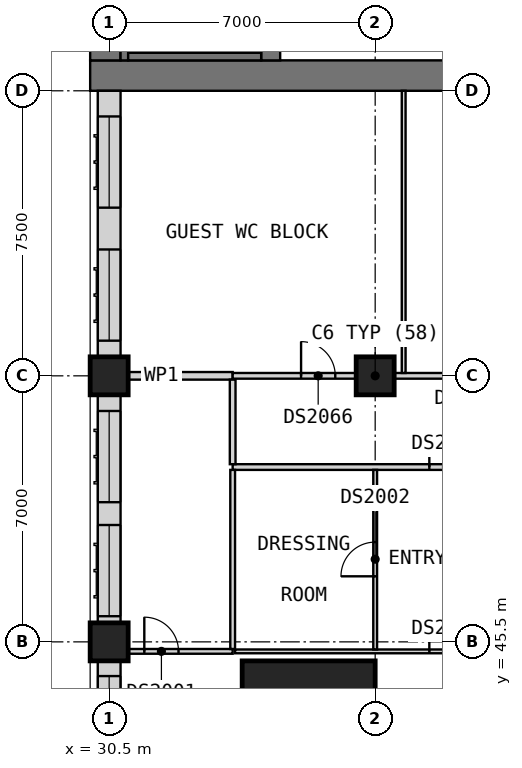
"""IFC4 building model, lengths in metres.
Left out: names, types, materials, properties, quantities, classifications, styles, units other than length and angle.
Written with IfcOpenShell. Run it as: python <this file> out.ifc"""

import sys

from ifc_helpers import new_model, si_unit, direction, frame, frame_2d, origin, origin_2d, place, context, subcontext, project, spatial, rectangle, extrude, element, fill, save


model = new_model("IFC4")
c1 = context("Model", 3, precision=1e-05, world=origin(), true_north=direction((0.0, 1.0)))
c2 = subcontext(c1, "Body", "Model", "MODEL_VIEW")
j1 = project(units=[si_unit("LENGTHUNIT", "METRE"), si_unit("PLANEANGLEUNIT", "RADIAN")], contexts=[c1])
p1 = place(None, origin())
s1 = spatial("IfcSite", under=j1, at=p1, CompositionType="ELEMENT")
p2 = place(p1, origin())
s2 = spatial("IfcBuilding", under=s1, at=p2, CompositionType="ELEMENT")
p3 = place(p2, frame((0.0, 0.0, 133.8)))
s3 = spatial("IfcBuildingStorey", under=s2, at=p3, CompositionType="ELEMENT", Elevation=133.8)
for number, where, z_axis, x_axis in (
    (1, (30.5, 45.5, 0.0), (0.0, 0.0, 1.0), (1.0, 0.0, 0.0)),
    (2, (30.5, 52.5, 0.0), (0.0, 0.0, 1.0), (1.0, 0.0, 0.0)),
    (3, (37.5, 52.5, 0.0), (0.0, 0.0, 1.0), (1.0, 0.0, 0.0)),
):
    element("IfcColumn", number, at=place(p3, frame(where, z_axis=z_axis, x_axis=x_axis)), inside=s3, PredefinedType="COLUMN", context=c2, shape_type="SweptSolid", body=[
        extrude(rectangle(XDim=1.0, YDim=1.0, at=origin_2d()), origin(), (0.0, 0.0, 1.0), 3.6),
    ])
p4 = place(p3, frame((35.75, 43.25, 0.0), z_axis=(0.0, 0.0, 1.0), x_axis=(1.0, 0.0, 0.0)))
e4 = element("IfcColumn", 4, at=p4, inside=s3, PredefinedType="COLUMN", context=c2, shape_type="SweptSolid", body=[
    extrude(rectangle(XDim=3.5, YDim=3.5, at=origin_2d()), origin(), (0.0, 0.0, 1.0), 3.6),
])
p5 = place(p3, frame((30.0, 60.4, 0.0), z_axis=(0.0, 0.0, 1.0), x_axis=(1.0, 0.0, 0.0)))
e5 = element("IfcWall", 5, at=p5, inside=s3, PredefinedType="SHEAR", context=c2, shape_type="SweptSolid", body=[
    extrude(rectangle(XDim=30.0, YDim=0.8, at=frame_2d((15.0, 0.0))), origin(), (0.0, 0.0, 1.0), 3.6),
])
p6 = place(p5, frame((21.9, 0.0, 0.0)))
e6 = element("IfcOpeningElement", 6, at=p6, cuts=e5, PredefinedType="OPENING", context=c2, shape_type="SweptSolid", body=[
    extrude(rectangle(XDim=1.8, YDim=2.1, at=frame_2d((0.9, 1.05))), frame((0.0, 0.41, 0.0), z_axis=(0.0, -1.0, 0.0), x_axis=(1.0, 0.0, 0.0)), (0.0, 0.0, 1.0), 0.82),
])
p7 = place(p5, frame((26.5, 0.0, 0.0)))
e7 = element("IfcOpeningElement", 7, at=p7, cuts=e5, PredefinedType="OPENING", context=c2, shape_type="SweptSolid", body=[
    extrude(rectangle(XDim=1.2, YDim=2.1, at=frame_2d((0.6, 1.05))), frame((0.0, 0.41, 0.0), z_axis=(0.0, -1.0, 0.0), x_axis=(1.0, 0.0, 0.0)), (0.0, 0.0, 1.0), 0.82),
])
p8 = place(p3, frame((30.4, 60.8, 0.0), z_axis=(0.0, 0.0, 1.0), x_axis=(0.0, 1.0, 0.0)))
e8 = element("IfcWall", 8, at=p8, inside=s3, PredefinedType="SHEAR", context=c2, shape_type="SweptSolid", body=[
    extrude(rectangle(XDim=20.9, YDim=0.8, at=frame_2d((10.45, 0.0))), origin(), (0.0, 0.0, 1.0), 3.6),
])
p9 = place(p3, frame((34.75, 60.8, 0.0), z_axis=(0.0, 0.0, 1.0), x_axis=(0.0, 1.0, 0.0)))
e9 = element("IfcWall", 9, at=p9, inside=s3, PredefinedType="SHEAR", context=c2, shape_type="SweptSolid", body=[
    extrude(rectangle(XDim=3.4, YDim=0.5, at=frame_2d((1.7, 0.0))), origin(), (0.0, 0.0, 1.0), 3.6),
])
p10 = place(p3, frame((30.5, 60.0, 0.0), z_axis=(0.0, 0.0, 1.0), x_axis=(0.0, -1.0, 0.0)))
e10 = element("IfcWall", 10, at=p10, inside=s3, PredefinedType="SOLIDWALL", context=c2, shape_type="SweptSolid", body=[
    extrude(rectangle(XDim=7.0, YDim=0.6, at=frame_2d((3.5, 0.0))), origin(), (0.0, 0.0, 1.0), 3.35),
])
p11 = place(p10, frame((4.175, 0.0, 0.8)))
e11 = element("IfcOpeningElement", 11, at=p11, cuts=e10, PredefinedType="OPENING", context=c2, shape_type="SweptSolid", body=[
    extrude(rectangle(XDim=2.4, YDim=1.8, at=frame_2d((1.2, 0.9))), frame((0.0, 0.31, 0.0), z_axis=(0.0, -1.0, 0.0), x_axis=(1.0, 0.0, 0.0)), (0.0, 0.0, 1.0), 0.62),
])
p12 = place(p10, frame((0.675, 0.0, 0.8)))
e12 = element("IfcOpeningElement", 12, at=p12, cuts=e10, PredefinedType="OPENING", context=c2, shape_type="SweptSolid", body=[
    extrude(rectangle(XDim=2.4, YDim=1.8, at=frame_2d((1.2, 0.9))), frame((0.0, 0.31, 0.0), z_axis=(0.0, -1.0, 0.0), x_axis=(1.0, 0.0, 0.0)), (0.0, 0.0, 1.0), 0.62),
])
p13 = place(p3, frame((30.5, 52.0, 0.0), z_axis=(0.0, 0.0, 1.0), x_axis=(0.0, -1.0, 0.0)))
e13 = element("IfcWall", 13, at=p13, inside=s3, PredefinedType="SOLIDWALL", context=c2, shape_type="SweptSolid", body=[
    extrude(rectangle(XDim=6.0, YDim=0.6, at=frame_2d((3.0, 0.0))), origin(), (0.0, 0.0, 1.0), 2.85),
])
p14 = place(p13, frame((3.425, 0.0, 0.8)))
e14 = element("IfcOpeningElement", 14, at=p14, cuts=e13, PredefinedType="OPENING", context=c2, shape_type="SweptSolid", body=[
    extrude(rectangle(XDim=2.4, YDim=1.8, at=frame_2d((1.2, 0.9))), frame((0.0, 0.31, 0.0), z_axis=(0.0, -1.0, 0.0), x_axis=(1.0, 0.0, 0.0)), (0.0, 0.0, 1.0), 0.62),
])
p15 = place(p13, frame((0.425, 0.0, 0.8)))
e15 = element("IfcOpeningElement", 15, at=p15, cuts=e13, PredefinedType="OPENING", context=c2, shape_type="SweptSolid", body=[
    extrude(rectangle(XDim=2.4, YDim=1.8, at=frame_2d((1.2, 0.9))), frame((0.0, 0.31, 0.0), z_axis=(0.0, -1.0, 0.0), x_axis=(1.0, 0.0, 0.0)), (0.0, 0.0, 1.0), 0.62),
])
p16 = place(p3, frame((30.5, 45.0, 0.0), z_axis=(0.0, 0.0, 1.0), x_axis=(0.0, -1.0, 0.0)))
e16 = element("IfcWall", 16, at=p16, inside=s3, PredefinedType="SOLIDWALL", context=c2, shape_type="SweptSolid", body=[
    extrude(rectangle(XDim=3.5, YDim=0.6, at=frame_2d((1.75, 0.0))), origin(), (0.0, 0.0, 1.0), 3.35),
])
p17 = place(p16, frame((0.4, 0.0, 0.8)))
e17 = element("IfcOpeningElement", 17, at=p17, cuts=e16, PredefinedType="OPENING", context=c2, shape_type="SweptSolid", body=[
    extrude(rectangle(XDim=1.8, YDim=1.8, at=frame_2d((0.9, 0.9))), frame((0.0, 0.31, 0.0), z_axis=(0.0, -1.0, 0.0), x_axis=(1.0, 0.0, 0.0)), (0.0, 0.0, 1.0), 0.62),
])
p18 = place(p3, frame((30.9, 60.8, 0.0), z_axis=(0.0, 0.0, 1.0), x_axis=(0.0, 1.0, 0.0)))
e18 = element("IfcWall", 18, at=p18, inside=s3, PredefinedType="SOLIDWALL", context=c2, shape_type="SweptSolid", body=[
    extrude(rectangle(XDim=20.9, YDim=0.2, at=frame_2d((10.45, 0.0))), origin(), (0.0, 0.0, 1.0), 3.35),
])
p19 = place(p3, frame((31.0, 60.9, 0.0), z_axis=(0.0, 0.0, 1.0), x_axis=(1.0, 0.0, 0.0)))
e19 = element("IfcWall", 19, at=p19, inside=s3, PredefinedType="SOLIDWALL", context=c2, shape_type="SweptSolid", body=[
    extrude(rectangle(XDim=3.5, YDim=0.2, at=frame_2d((1.75, 0.0))), origin(), (0.0, 0.0, 1.0), 3.35),
])
p20 = place(p3, frame((30.0, 52.5, 0.0), z_axis=(0.0, 0.0, 1.0), x_axis=(1.0, 0.0, 0.0)))
e20 = element("IfcWall", 20, at=p20, inside=s3, PredefinedType="PARTITIONING", context=c2, shape_type="SweptSolid", body=[
    extrude(rectangle(XDim=3.75, YDim=0.2, at=frame_2d((1.875, 0.0))), origin(), (0.0, 0.0, 1.0), 3.35),
])
p21 = place(p3, frame((33.75, 50.1, 0.0), z_axis=(0.0, 0.0, 1.0), x_axis=(1.0, 0.0, 0.0)))
e21 = element("IfcWall", 21, at=p21, inside=s3, PredefinedType="PARTITIONING", context=c2, shape_type="SweptSolid", body=[
    extrude(rectangle(XDim=39.9, YDim=0.15, at=frame_2d((19.95, 0.0))), origin(), (0.0, 0.0, 1.0), 3.35),
])
p22 = place(p21, frame((5.175, 0.0, 0.0)))
e22 = element("IfcOpeningElement", 22, at=p22, cuts=e21, PredefinedType="OPENING", context=c2, shape_type="SweptSolid", body=[
    extrude(rectangle(XDim=0.9, YDim=2.1, at=frame_2d((0.45, 1.05))), frame((0.0, 0.085, 0.0), z_axis=(0.0, -1.0, 0.0), x_axis=(1.0, 0.0, 0.0)), (0.0, 0.0, 1.0), 0.17),
])
p23 = place(p21, frame((13.05, 0.0, 0.0)))
e23 = element("IfcOpeningElement", 23, at=p23, cuts=e21, PredefinedType="OPENING", context=c2, shape_type="SweptSolid", body=[
    extrude(rectangle(XDim=0.9, YDim=2.1, at=frame_2d((0.45, 1.05))), frame((0.0, 0.085, 0.0), z_axis=(0.0, -1.0, 0.0), x_axis=(1.0, 0.0, 0.0)), (0.0, 0.0, 1.0), 0.17),
])
p24 = place(p21, frame((20.55, 0.0, 0.0)))
e24 = element("IfcOpeningElement", 24, at=p24, cuts=e21, PredefinedType="OPENING", context=c2, shape_type="SweptSolid", body=[
    extrude(rectangle(XDim=0.9, YDim=2.1, at=frame_2d((0.45, 1.05))), frame((0.0, 0.085, 0.0), z_axis=(0.0, -1.0, 0.0), x_axis=(1.0, 0.0, 0.0)), (0.0, 0.0, 1.0), 0.17),
])
p25 = place(p21, frame((24.3, 0.0, 0.0)))
e25 = element("IfcOpeningElement", 25, at=p25, cuts=e21, PredefinedType="OPENING", context=c2, shape_type="SweptSolid", body=[
    extrude(rectangle(XDim=0.9, YDim=2.1, at=frame_2d((0.45, 1.05))), frame((0.0, 0.085, 0.0), z_axis=(0.0, -1.0, 0.0), x_axis=(1.0, 0.0, 0.0)), (0.0, 0.0, 1.0), 0.17),
])
p26 = place(p21, frame((36.113, 0.0, 0.0)))
e26 = element("IfcOpeningElement", 26, at=p26, cuts=e21, PredefinedType="OPENING", context=c2, shape_type="SweptSolid", body=[
    extrude(rectangle(XDim=0.9, YDim=2.1, at=frame_2d((0.45, 1.05))), frame((0.0, 0.085, 0.0), z_axis=(0.0, -1.0, 0.0), x_axis=(1.0, 0.0, 0.0)), (0.0, 0.0, 1.0), 0.17),
])
p27 = place(p21, frame((38.25, 0.0, 0.0)))
e27 = element("IfcOpeningElement", 27, at=p27, cuts=e21, PredefinedType="OPENING", context=c2, shape_type="SweptSolid", body=[
    extrude(rectangle(XDim=0.9, YDim=2.1, at=frame_2d((0.45, 1.05))), frame((0.0, 0.085, 0.0), z_axis=(0.0, -1.0, 0.0), x_axis=(1.0, 0.0, 0.0)), (0.0, 0.0, 1.0), 0.17),
])
p28 = place(p3, frame((33.75, 52.5, 0.0), z_axis=(0.0, 0.0, 1.0), x_axis=(1.0, 0.0, 0.0)))
e28 = element("IfcWall", 28, at=p28, inside=s3, PredefinedType="PARTITIONING", context=c2, shape_type="SweptSolid", body=[
    extrude(rectangle(XDim=17.15, YDim=0.15, at=frame_2d((8.575, 0.0))), origin(), (0.0, 0.0, 1.0), 3.35),
])
p29 = place(p28, frame((1.8, 0.0, 0.0)))
e29 = element("IfcOpeningElement", 29, at=p29, cuts=e28, PredefinedType="OPENING", context=c2, shape_type="SweptSolid", body=[
    extrude(rectangle(XDim=0.9, YDim=2.1, at=frame_2d((0.45, 1.05))), frame((0.0, 0.085, 0.0), z_axis=(0.0, -1.0, 0.0), x_axis=(1.0, 0.0, 0.0)), (0.0, 0.0, 1.0), 0.17),
])
p30 = place(p28, frame((5.775, 0.0, 0.0)))
e30 = element("IfcOpeningElement", 30, at=p30, cuts=e28, PredefinedType="OPENING", context=c2, shape_type="SweptSolid", body=[
    extrude(rectangle(XDim=0.9, YDim=2.1, at=frame_2d((0.45, 1.05))), frame((0.0, 0.085, 0.0), z_axis=(0.0, -1.0, 0.0), x_axis=(1.0, 0.0, 0.0)), (0.0, 0.0, 1.0), 0.17),
])
p31 = place(p28, frame((12.1, 0.0, 0.0)))
e31 = element("IfcOpeningElement", 31, at=p31, cuts=e28, PredefinedType="OPENING", context=c2, shape_type="SweptSolid", body=[
    extrude(rectangle(XDim=0.9, YDim=2.1, at=frame_2d((0.45, 1.05))), frame((0.0, 0.085, 0.0), z_axis=(0.0, -1.0, 0.0), x_axis=(1.0, 0.0, 0.0)), (0.0, 0.0, 1.0), 0.17),
])
p32 = place(p3, frame((33.75, 50.175, 0.0), z_axis=(0.0, 0.0, 1.0), x_axis=(0.0, 1.0, 0.0)))
e32 = element("IfcWall", 32, at=p32, inside=s3, PredefinedType="PARTITIONING", context=c2, shape_type="SweptSolid", body=[
    extrude(rectangle(XDim=2.225, YDim=0.15, at=frame_2d((1.112, 0.0))), origin(), (0.0, 0.0, 1.0), 3.35),
])
p33 = place(p3, frame((33.812, 45.25, 0.0), z_axis=(0.0, 0.0, 1.0), x_axis=(1.0, 0.0, 0.0)))
e33 = element("IfcWall", 33, at=p33, inside=s3, PredefinedType="PARTITIONING", context=c2, shape_type="SweptSolid", body=[
    extrude(rectangle(XDim=7.337, YDim=0.1, at=frame_2d((3.669, 0.0))), origin(), (0.0, 0.0, 1.0), 3.35),
])
p34 = place(p33, frame((5.113, 0.0, 0.0)))
e34 = element("IfcOpeningElement", 34, at=p34, cuts=e33, PredefinedType="OPENING", context=c2, shape_type="SweptSolid", body=[
    extrude(rectangle(XDim=0.9, YDim=2.1, at=frame_2d((0.45, 1.05))), frame((0.0, 0.06, 0.0), z_axis=(0.0, -1.0, 0.0), x_axis=(1.0, 0.0, 0.0)), (0.0, 0.0, 1.0), 0.12),
])
p35 = place(p3, frame((37.5, 45.3, 0.0), z_axis=(0.0, 0.0, 1.0), x_axis=(0.0, 1.0, 0.0)))
e35 = element("IfcWall", 35, at=p35, inside=s3, PredefinedType="PARTITIONING", context=c2, shape_type="SweptSolid", body=[
    extrude(rectangle(XDim=4.725, YDim=0.1, at=frame_2d((2.362, 0.0))), origin(), (0.0, 0.0, 1.0), 3.35),
])
p36 = place(p35, frame((1.925, 0.0, 0.0)))
e36 = element("IfcOpeningElement", 36, at=p36, cuts=e35, PredefinedType="OPENING", context=c2, shape_type="SweptSolid", body=[
    extrude(rectangle(XDim=0.9, YDim=2.1, at=frame_2d((0.45, 1.05))), frame((0.0, 0.06, 0.0), z_axis=(0.0, -1.0, 0.0), x_axis=(1.0, 0.0, 0.0)), (0.0, 0.0, 1.0), 0.12),
])
p37 = place(p3, frame((38.25, 52.575, 0.0), z_axis=(0.0, 0.0, 1.0), x_axis=(0.0, 1.0, 0.0)))
e37 = element("IfcWall", 37, at=p37, inside=s3, PredefinedType="PARTITIONING", context=c2, shape_type="SweptSolid", body=[
    extrude(rectangle(XDim=7.425, YDim=0.1, at=frame_2d((3.712, 0.0))), origin(), (0.0, 0.0, 1.0), 3.35),
])
p38 = place(p3, frame((30.0, 45.25, 0.0), z_axis=(0.0, 0.0, 1.0), x_axis=(1.0, 0.0, 0.0)))
e38 = element("IfcWall", 38, at=p38, inside=s3, PredefinedType="PARTITIONING", context=c2, shape_type="SweptSolid", body=[
    extrude(rectangle(XDim=3.75, YDim=0.125, at=frame_2d((1.875, 0.0))), origin(), (0.0, 0.0, 1.0), 3.35),
])
p39 = place(p38, frame((1.425, 0.0, 0.0)))
e39 = element("IfcOpeningElement", 39, at=p39, cuts=e38, PredefinedType="OPENING", context=c2, shape_type="SweptSolid", body=[
    extrude(rectangle(XDim=0.9, YDim=2.1, at=frame_2d((0.45, 1.05))), frame((0.0, 0.073, 0.0), z_axis=(0.0, -1.0, 0.0), x_axis=(1.0, 0.0, 0.0)), (0.0, 0.0, 1.0), 0.145),
])
p40 = place(p3, frame((33.75, 45.312, 0.0), z_axis=(0.0, 0.0, 1.0), x_axis=(0.0, 1.0, 0.0)))
e40 = element("IfcWall", 40, at=p40, inside=s3, PredefinedType="PARTITIONING", context=c2, shape_type="SweptSolid", body=[
    extrude(rectangle(XDim=4.712, YDim=0.125, at=frame_2d((2.356, 0.0))), origin(), (0.0, 0.0, 1.0), 3.35),
])
p41 = place(p11, origin())
e41 = element("IfcWindow", 41, at=p41, inside=s3, PartitioningType="SINGLE_PANEL", PredefinedType="WINDOW", context=c2, shape_type="SweptSolid", body=[
    extrude(rectangle(XDim=2.4, YDim=1.8, at=frame_2d((1.2, 0.9))), frame((0.0, -0.07, 0.0), z_axis=(0.0, -1.0, 0.0), x_axis=(1.0, 0.0, 0.0)), (0.0, 0.0, 1.0), 0.06),
])
fill(e11, e41)
p42 = place(p12, origin())
e42 = element("IfcWindow", 42, at=p42, inside=s3, PartitioningType="SINGLE_PANEL", PredefinedType="WINDOW", context=c2, shape_type="SweptSolid", body=[
    extrude(rectangle(XDim=2.4, YDim=1.8, at=frame_2d((1.2, 0.9))), frame((0.0, -0.07, 0.0), z_axis=(0.0, -1.0, 0.0), x_axis=(1.0, 0.0, 0.0)), (0.0, 0.0, 1.0), 0.06),
])
fill(e12, e42)
p43 = place(p14, origin())
e43 = element("IfcWindow", 43, at=p43, inside=s3, PartitioningType="SINGLE_PANEL", PredefinedType="WINDOW", context=c2, shape_type="SweptSolid", body=[
    extrude(rectangle(XDim=2.4, YDim=1.8, at=frame_2d((1.2, 0.9))), frame((0.0, -0.07, 0.0), z_axis=(0.0, -1.0, 0.0), x_axis=(1.0, 0.0, 0.0)), (0.0, 0.0, 1.0), 0.06),
])
fill(e14, e43)
p44 = place(p15, origin())
e44 = element("IfcWindow", 44, at=p44, inside=s3, PartitioningType="SINGLE_PANEL", PredefinedType="WINDOW", context=c2, shape_type="SweptSolid", body=[
    extrude(rectangle(XDim=2.4, YDim=1.8, at=frame_2d((1.2, 0.9))), frame((0.0, -0.07, 0.0), z_axis=(0.0, -1.0, 0.0), x_axis=(1.0, 0.0, 0.0)), (0.0, 0.0, 1.0), 0.06),
])
fill(e15, e44)
p45 = place(p17, origin())
e45 = element("IfcWindow", 45, at=p45, inside=s3, PartitioningType="SINGLE_PANEL", PredefinedType="WINDOW", context=c2, shape_type="SweptSolid", body=[
    extrude(rectangle(XDim=1.8, YDim=1.8, at=frame_2d((0.9, 0.9))), frame((0.0, -0.07, 0.0), z_axis=(0.0, -1.0, 0.0), x_axis=(1.0, 0.0, 0.0)), (0.0, 0.0, 1.0), 0.06),
])
fill(e17, e45)
p46 = place(p39, origin())
e46 = element("IfcDoor", 46, at=p46, inside=s3, OperationType="SINGLE_SWING_LEFT", PredefinedType="DOOR", context=c2, shape_type="SweptSolid", body=[
    extrude(rectangle(XDim=0.9, YDim=2.1, at=frame_2d((0.45, 1.05))), frame((0.0, 0.025, 0.0), z_axis=(0.0, -1.0, 0.0), x_axis=(1.0, 0.0, 0.0)), (0.0, 0.0, 1.0), 0.05),
])
fill(e39, e46)
p47 = place(p36, origin())
e47 = element("IfcDoor", 47, at=p47, inside=s3, OperationType="SINGLE_SWING_RIGHT", PredefinedType="DOOR", context=c2, shape_type="SweptSolid", body=[
    extrude(rectangle(XDim=0.9, YDim=2.1, at=frame_2d((0.45, 1.05))), frame((0.0, 0.025, 0.0), z_axis=(0.0, -1.0, 0.0), x_axis=(1.0, 0.0, 0.0)), (0.0, 0.0, 1.0), 0.05),
])
fill(e36, e47)
p48 = place(p22, origin())
e48 = element("IfcDoor", 48, at=p48, inside=s3, OperationType="SINGLE_SWING_RIGHT", PredefinedType="DOOR", context=c2, shape_type="SweptSolid", body=[
    extrude(rectangle(XDim=0.9, YDim=2.1, at=frame_2d((0.45, 1.05))), frame((0.0, 0.025, 0.0), z_axis=(0.0, -1.0, 0.0), x_axis=(1.0, 0.0, 0.0)), (0.0, 0.0, 1.0), 0.05),
])
fill(e22, e48)
p49 = place(p34, origin())
e49 = element("IfcDoor", 49, at=p49, inside=s3, OperationType="SINGLE_SWING_LEFT", PredefinedType="DOOR", context=c2, shape_type="SweptSolid", body=[
    extrude(rectangle(XDim=0.9, YDim=2.1, at=frame_2d((0.45, 1.05))), frame((0.0, 0.025, 0.0), z_axis=(0.0, -1.0, 0.0), x_axis=(1.0, 0.0, 0.0)), (0.0, 0.0, 1.0), 0.05),
])
fill(e34, e49)
p50 = place(p29, origin())
e50 = element("IfcDoor", 50, at=p50, inside=s3, OperationType="SINGLE_SWING_LEFT", PredefinedType="DOOR", context=c2, shape_type="SweptSolid", body=[
    extrude(rectangle(XDim=0.9, YDim=2.1, at=frame_2d((0.45, 1.05))), frame((0.0, 0.025, 0.0), z_axis=(0.0, -1.0, 0.0), x_axis=(1.0, 0.0, 0.0)), (0.0, 0.0, 1.0), 0.05),
])
fill(e29, e50)
save(model, sys.argv[1])
